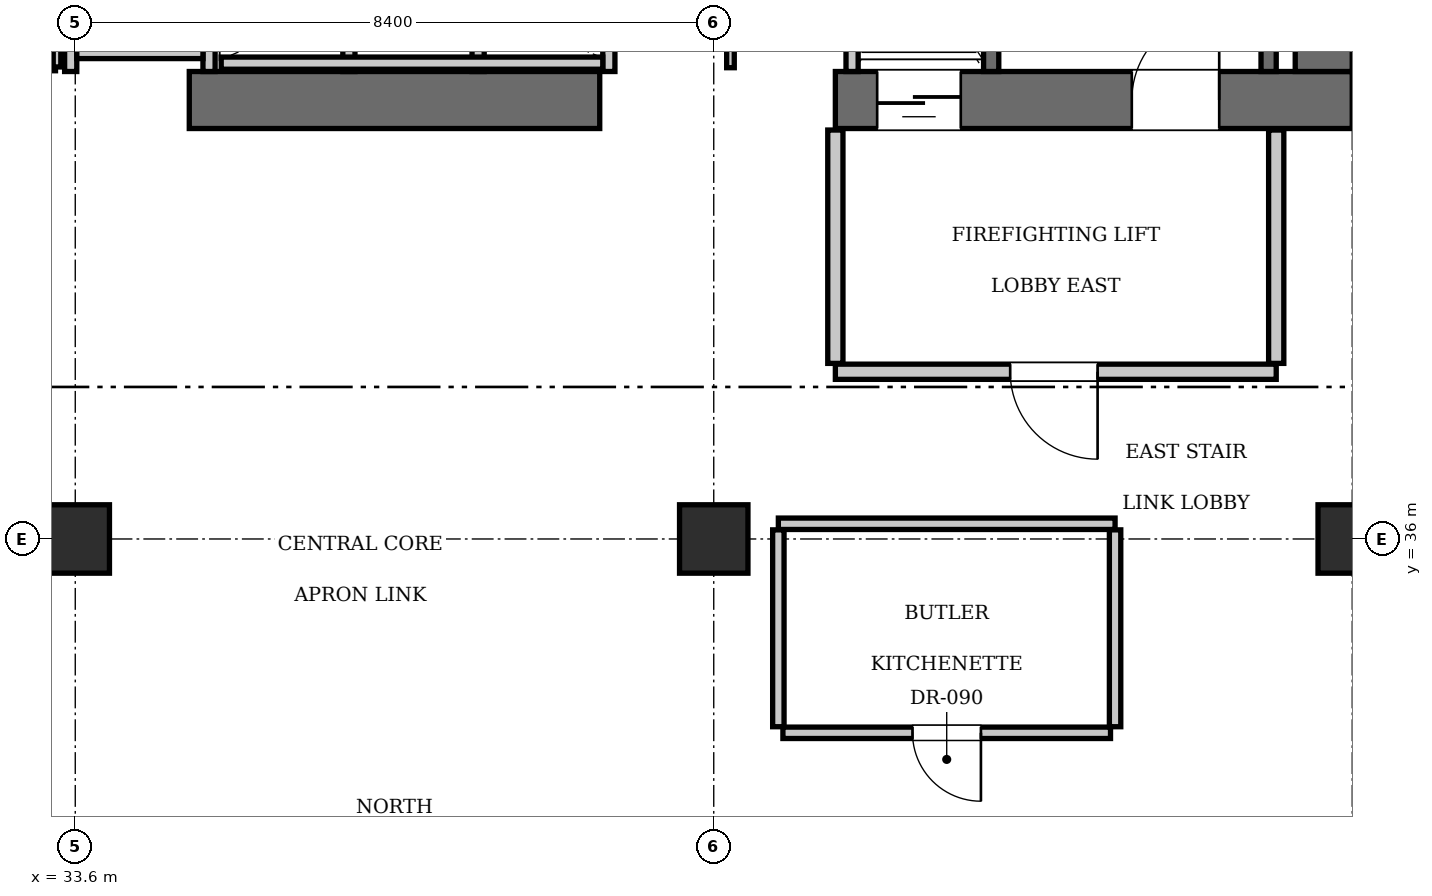
"""IFC4 building model, lengths in metres.
Left out: names, types, materials, properties, quantities, classifications, styles, units other than length and angle.
Written with IfcOpenShell. Run it as: python <this file> out.ifc"""

import sys

from ifc_helpers import new_model, si_unit, direction, frame, frame_2d, origin, origin_2d, place, context, subcontext, project, spatial, rectangle, extrude, element, fill, save


model = new_model("IFC4")
c1 = context("Model", 3, precision=1e-05, world=origin(), true_north=direction((0.0, 1.0)))
c2 = subcontext(c1, "Body", "Model", "MODEL_VIEW")
j1 = project(units=[si_unit("LENGTHUNIT", "METRE"), si_unit("PLANEANGLEUNIT", "RADIAN")], contexts=[c1])
p1 = place(None, origin())
s1 = spatial("IfcSite", under=j1, at=p1, CompositionType="ELEMENT")
p2 = place(p1, origin())
s2 = spatial("IfcBuilding", under=s1, at=p2, CompositionType="ELEMENT")
p3 = place(p2, frame((0.0, 0.0, 142.8)))
s3 = spatial("IfcBuildingStorey", under=s2, at=p3, CompositionType="ELEMENT", Elevation=142.8)
p4 = place(p3, frame((35.1, 41.775, 0.0), z_axis=(0.0, 0.0, 1.0), x_axis=(1.0, 0.0, 0.0)))
e1 = element("IfcWall", 1, at=p4, inside=s3, PredefinedType="SHEAR", context=c2, shape_type="SweptSolid", body=[
    extrude(rectangle(XDim=5.4, YDim=0.75, at=frame_2d((2.7, 0.0))), origin(), (0.0, 0.0, 1.0), 3.85),
])
p5 = place(p3, frame((43.6, 41.775, 0.0), z_axis=(0.0, 0.0, 1.0), x_axis=(1.0, 0.0, 0.0)))
e2 = element("IfcWall", 2, at=p5, inside=s3, PredefinedType="SHEAR", context=c2, shape_type="SweptSolid", body=[
    extrude(rectangle(XDim=6.8, YDim=0.75, at=frame_2d((3.4, 0.0))), origin(), (0.0, 0.0, 1.0), 3.85),
])
p6 = place(p5, frame((3.9, 0.0, 0.0)))
e3 = element("IfcOpeningElement", 3, at=p6, cuts=e2, PredefinedType="OPENING", context=c2, shape_type="SweptSolid", body=[
    extrude(rectangle(XDim=1.15, YDim=2.15, at=frame_2d((0.575, 1.075))), frame((0.0, 0.385, 0.0), z_axis=(0.0, -1.0, 0.0), x_axis=(1.0, 0.0, 0.0)), (0.0, 0.0, 1.0), 0.77),
])
p7 = place(p5, frame((0.55, 0.0, 0.0)))
e4 = element("IfcOpeningElement", 4, at=p7, cuts=e2, PredefinedType="OPENING", context=c2, shape_type="SweptSolid", body=[
    extrude(rectangle(XDim=1.1, YDim=2.2, at=frame_2d((0.55, 1.1))), frame((0.0, 0.385, 0.0), z_axis=(0.0, -1.0, 0.0), x_axis=(1.0, 0.0, 0.0)), (0.0, 0.0, 1.0), 0.77),
])
p8 = place(p3, frame((50.025, 42.15, 0.0), z_axis=(0.0, 0.0, 1.0), x_axis=(0.0, 1.0, 0.0)))
e5 = element("IfcWall", 5, at=p8, inside=s3, PredefinedType="SHEAR", context=c2, shape_type="SweptSolid", body=[
    extrude(rectangle(XDim=1.9, YDim=0.75, at=frame_2d((0.95, 0.0))), origin(), (0.0, 0.0, 1.0), 3.85),
])
for number, where, z_axis, x_axis in (
    (6, (33.6, 36.0, 0.0), (0.0, 0.0, 1.0), (1.0, 0.0, 0.0)),
    (7, (42.0, 36.0, 0.0), (0.0, 0.0, 1.0), (1.0, 0.0, 0.0)),
    (8, (50.4, 36.0, 0.0), (0.0, 0.0, 1.0), (1.0, 0.0, 0.0)),
):
    element("IfcColumn", number, at=place(p3, frame(where, z_axis=z_axis, x_axis=x_axis)), inside=s3, PredefinedType="COLUMN", context=c2, shape_type="SweptSolid", body=[
        extrude(rectangle(XDim=0.9, YDim=0.9, at=origin_2d()), origin(), (0.0, 0.0, 1.0), 3.85),
    ])
p9 = place(p3, frame((45.65, 42.15, 0.0), z_axis=(0.0, 0.0, 1.0), x_axis=(0.0, 1.0, 0.0)))
e9 = element("IfcWall", 9, at=p9, inside=s3, PredefinedType="SOLIDWALL", context=c2, shape_type="SweptSolid", body=[
    extrude(rectangle(XDim=9.0, YDim=0.2, at=frame_2d((4.5, 0.0))), origin(), (0.0, 0.0, 1.0), 3.61),
])
p10 = place(p3, frame((49.3, 42.15, 0.0), z_axis=(0.0, 0.0, 1.0), x_axis=(0.0, 1.0, 0.0)))
e10 = element("IfcWall", 10, at=p10, inside=s3, PredefinedType="SOLIDWALL", context=c2, shape_type="SweptSolid", body=[
    extrude(rectangle(XDim=1.87, YDim=0.2, at=frame_2d((0.935, 0.0))), origin(), (0.0, 0.0, 1.0), 3.61),
])
p11 = place(p3, frame((43.82, 42.15, 0.0), z_axis=(0.0, 0.0, 1.0), x_axis=(0.0, 1.0, 0.0)))
e11 = element("IfcWall", 11, at=p11, inside=s3, PredefinedType="SOLIDWALL", context=c2, shape_type="SweptSolid", body=[
    extrude(rectangle(XDim=2.59, YDim=0.16, at=frame_2d((1.295, 0.0))), origin(), (0.0, 0.0, 1.0), 3.61),
])
for number, where, z_axis, x_axis in (
    (12, (37.2, 42.15, 0.0), (0.0, 0.0, 1.0), (0.0, 1.0, 0.0)),
    (13, (38.9, 42.15, 0.0), (0.0, 0.0, 1.0), (0.0, 1.0, 0.0)),
    (14, (40.62, 42.15, 0.0), (0.0, 0.0, 1.0), (0.0, 1.0, 0.0)),
):
    element("IfcWall", number, at=place(p3, frame(where, z_axis=z_axis, x_axis=x_axis)), inside=s3, PredefinedType="SOLIDWALL", context=c2, shape_type="SweptSolid", body=[
        extrude(rectangle(XDim=2.2, YDim=0.16, at=frame_2d((1.1, 0.0))), origin(), (0.0, 0.0, 1.0), 3.61),
    ])
p12 = place(p3, frame((35.52, 42.26, 0.0), z_axis=(0.0, 0.0, 1.0), x_axis=(1.0, 0.0, 0.0)))
e15 = element("IfcWall", 15, at=p12, inside=s3, PredefinedType="SOLIDWALL", context=c2, shape_type="SweptSolid", body=[
    extrude(rectangle(XDim=5.02, YDim=0.16, at=frame_2d((2.51, 0.0))), origin(), (0.0, 0.0, 1.0), 3.61),
])
for number, where, z_axis, x_axis in (
    (16, (33.54, 42.15, 0.0), (0.0, 0.0, 1.0), (0.0, 1.0, 0.0)),
    (17, (35.36, 42.15, 0.0), (0.0, 0.0, 1.0), (0.0, 1.0, 0.0)),
):
    element("IfcWall", number, at=place(p3, frame(where, z_axis=z_axis, x_axis=x_axis)), inside=s3, PredefinedType="SOLIDWALL", context=c2, shape_type="SweptSolid", body=[
        extrude(rectangle(XDim=2.25, YDim=0.16, at=frame_2d((1.125, 0.0))), origin(), (0.0, 0.0, 1.0), 3.61),
    ])
p13 = place(p3, frame((33.62, 42.4, 0.0), z_axis=(0.0, 0.0, 1.0), x_axis=(1.0, 0.0, 0.0)))
e18 = element("IfcWall", 18, at=p13, inside=s3, PredefinedType="SOLIDWALL", context=c2, shape_type="SweptSolid", body=[
    extrude(rectangle(XDim=1.66, YDim=0.16, at=frame_2d((0.83, 0.0))), origin(), (0.0, 0.0, 1.0), 3.61),
])
p14 = place(p3, frame((43.6, 38.2, 0.0), z_axis=(0.0, 0.0, 1.0), x_axis=(1.0, 0.0, 0.0)))
e19 = element("IfcWall", 19, at=p14, inside=s3, PredefinedType="PARTITIONING", context=c2, shape_type="SweptSolid", body=[
    extrude(rectangle(XDim=5.8, YDim=0.2, at=frame_2d((2.9, 0.0))), origin(), (0.0, 0.0, 1.0), 3.61),
])
p15 = place(p14, frame((2.3, 0.0, 0.0)))
e20 = element("IfcOpeningElement", 20, at=p15, cuts=e19, PredefinedType="OPENING", context=c2, shape_type="SweptSolid", body=[
    extrude(rectangle(XDim=1.15, YDim=2.15, at=frame_2d((0.575, 1.075))), frame((0.0, 0.11, 0.0), z_axis=(0.0, -1.0, 0.0), x_axis=(1.0, 0.0, 0.0)), (0.0, 0.0, 1.0), 0.22),
])
for number, where, z_axis, x_axis in (
    (21, (43.6, 38.31, 0.0), (0.0, 0.0, 1.0), (0.0, 1.0, 0.0)),
    (22, (49.4, 38.31, 0.0), (0.0, 0.0, 1.0), (0.0, 1.0, 0.0)),
):
    element("IfcWall", number, at=place(p3, frame(where, z_axis=z_axis, x_axis=x_axis)), inside=s3, PredefinedType="PARTITIONING", context=c2, shape_type="SweptSolid", body=[
        extrude(rectangle(XDim=3.07, YDim=0.2, at=frame_2d((1.535, 0.0))), origin(), (0.0, 0.0, 1.0), 3.61),
    ])
p16 = place(p3, frame((32.02, 42.21, 0.0), z_axis=(0.0, 0.0, 1.0), x_axis=(1.0, 0.0, 0.0)))
e23 = element("IfcWall", 23, at=p16, inside=s3, PredefinedType="PARTITIONING", context=c2, shape_type="SweptSolid", body=[
    extrude(rectangle(XDim=1.32, YDim=0.1, at=frame_2d((0.66, 0.0))), origin(), (0.0, 0.0, 1.0), 3.61),
])
p17 = place(p16, frame((0.24, 0.0, 0.0)))
e24 = element("IfcOpeningElement", 24, at=p17, cuts=e23, PredefinedType="OPENING", context=c2, shape_type="SweptSolid", body=[
    extrude(rectangle(XDim=0.8, YDim=2.05, at=frame_2d((0.4, 1.025))), frame((0.0, 0.06, 0.0), z_axis=(0.0, -1.0, 0.0), x_axis=(1.0, 0.0, 0.0)), (0.0, 0.0, 1.0), 0.12),
])
p18 = place(p3, frame((33.36, 42.21, 0.0), z_axis=(0.0, 0.0, 1.0), x_axis=(0.0, 1.0, 0.0)))
e25 = element("IfcWall", 25, at=p18, inside=s3, PredefinedType="PARTITIONING", context=c2, shape_type="SweptSolid", body=[
    extrude(rectangle(XDim=2.73, YDim=0.1, at=frame_2d((1.365, 0.0))), origin(), (0.0, 0.0, 1.0), 3.61),
])
p19 = place(p3, frame((42.22, 42.2, 0.0), z_axis=(0.0, 0.0, 1.0), x_axis=(0.0, 1.0, 0.0)))
e26 = element("IfcWall", 26, at=p19, inside=s3, PredefinedType="PARTITIONING", context=c2, shape_type="SweptSolid", body=[
    extrude(rectangle(XDim=2.76, YDim=0.1, at=frame_2d((1.38, 0.0))), origin(), (0.0, 0.0, 1.0), 3.61),
])
p20 = place(p19, frame((0.65, 0.0, 0.0)))
e27 = element("IfcOpeningElement", 27, at=p20, cuts=e26, PredefinedType="OPENING", context=c2, shape_type="SweptSolid", body=[
    extrude(rectangle(XDim=0.8, YDim=2.05, at=frame_2d((0.4, 1.025))), frame((0.0, 0.06, 0.0), z_axis=(0.0, -1.0, 0.0), x_axis=(1.0, 0.0, 0.0)), (0.0, 0.0, 1.0), 0.12),
])
p21 = place(p3, frame((42.85, 36.2, 0.0), z_axis=(0.0, 0.0, 1.0), x_axis=(1.0, 0.0, 0.0)))
e28 = element("IfcWall", 28, at=p21, inside=s3, PredefinedType="PARTITIONING", context=c2, shape_type="SweptSolid", body=[
    extrude(rectangle(XDim=4.43, YDim=0.15, at=frame_2d((2.215, 0.0))), origin(), (0.0, 0.0, 1.0), 3.61),
])
for number, where, z_axis, x_axis in (
    (29, (42.85, 33.53, 0.0), (0.0, 0.0, 1.0), (0.0, 1.0, 0.0)),
    (30, (47.28, 33.53, 0.0), (0.0, 0.0, 1.0), (0.0, 1.0, 0.0)),
):
    element("IfcWall", number, at=place(p3, frame(where, z_axis=z_axis, x_axis=x_axis)), inside=s3, PredefinedType="PARTITIONING", context=c2, shape_type="SweptSolid", body=[
        extrude(rectangle(XDim=2.59, YDim=0.15, at=frame_2d((1.295, 0.0))), origin(), (0.0, 0.0, 1.0), 3.61),
    ])
p22 = place(p3, frame((42.91, 33.45, 0.0), z_axis=(0.0, 0.0, 1.0), x_axis=(1.0, 0.0, 0.0)))
e31 = element("IfcWall", 31, at=p22, inside=s3, PredefinedType="PARTITIONING", context=c2, shape_type="SweptSolid", body=[
    extrude(rectangle(XDim=4.31, YDim=0.15, at=frame_2d((2.155, 0.0))), origin(), (0.0, 0.0, 1.0), 3.61),
])
p23 = place(p22, frame((1.705, 0.0, 0.0)))
e32 = element("IfcOpeningElement", 32, at=p23, cuts=e31, PredefinedType="OPENING", context=c2, shape_type="SweptSolid", body=[
    extrude(rectangle(XDim=0.9, YDim=2.1, at=frame_2d((0.45, 1.05))), frame((0.0, 0.085, 0.0), z_axis=(0.0, -1.0, 0.0), x_axis=(1.0, 0.0, 0.0)), (0.0, 0.0, 1.0), 0.17),
])
p24 = place(p6, origin())
e33 = element("IfcDoor", 33, at=p24, inside=s3, OperationType="SINGLE_SWING_RIGHT", PredefinedType="DOOR", context=c2, shape_type="SweptSolid", body=[
    extrude(rectangle(XDim=1.15, YDim=2.15, at=frame_2d((0.575, 1.075))), frame((0.0, 0.025, 0.0), z_axis=(0.0, -1.0, 0.0), x_axis=(1.0, 0.0, 0.0)), (0.0, 0.0, 1.0), 0.05),
])
fill(e3, e33)
p25 = place(p7, frame((1.1, 0.0, 0.0), z_axis=(0.0, 0.0, 1.0), x_axis=(-1.0, 0.0, 0.0)))
e34 = element("IfcDoor", 34, at=p25, inside=s3, OperationType="SLIDING_TO_LEFT", PredefinedType="DOOR", context=c2, shape_type="SweptSolid", body=[
    extrude(rectangle(XDim=1.1, YDim=2.2, at=frame_2d((0.55, 1.1))), frame((0.0, 0.025, 0.0), z_axis=(0.0, -1.0, 0.0), x_axis=(1.0, 0.0, 0.0)), (0.0, 0.0, 1.0), 0.05),
])
fill(e4, e34)
p26 = place(p15, frame((1.15, 0.0, 0.0), z_axis=(0.0, 0.0, 1.0), x_axis=(-1.0, 0.0, 0.0)))
e35 = element("IfcDoor", 35, at=p26, inside=s3, OperationType="SINGLE_SWING_LEFT", PredefinedType="DOOR", context=c2, shape_type="SweptSolid", body=[
    extrude(rectangle(XDim=1.15, YDim=2.15, at=frame_2d((0.575, 1.075))), frame((0.0, 0.025, 0.0), z_axis=(0.0, -1.0, 0.0), x_axis=(1.0, 0.0, 0.0)), (0.0, 0.0, 1.0), 0.05),
])
fill(e20, e35)
p27 = place(p23, frame((0.9, 0.0, 0.0), z_axis=(0.0, 0.0, 1.0), x_axis=(-1.0, 0.0, 0.0)))
e36 = element("IfcDoor", 36, at=p27, inside=s3, OperationType="SINGLE_SWING_LEFT", PredefinedType="DOOR", context=c2, shape_type="SweptSolid", body=[
    extrude(rectangle(XDim=0.9, YDim=2.1, at=frame_2d((0.45, 1.05))), frame((0.0, 0.025, 0.0), z_axis=(0.0, -1.0, 0.0), x_axis=(1.0, 0.0, 0.0)), (0.0, 0.0, 1.0), 0.05),
])
fill(e32, e36)
save(model, sys.argv[1])
